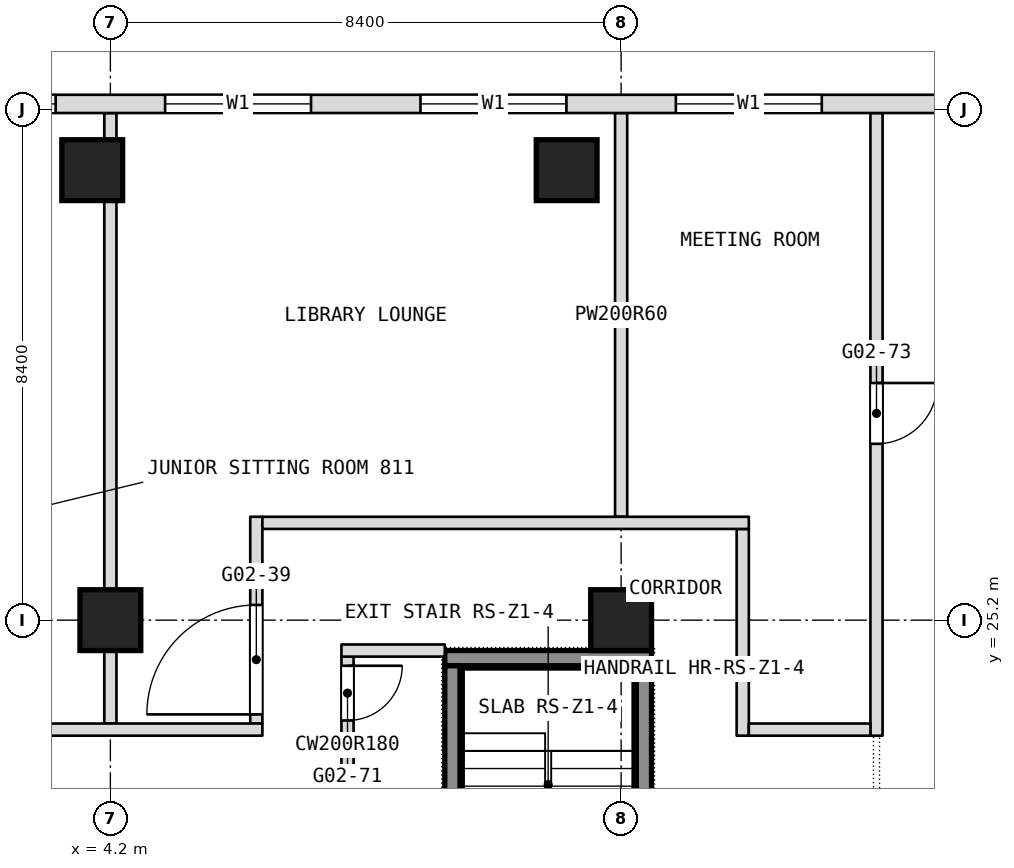
"""IFC4 building model, lengths in metres.
Left out: names, types, materials, properties, quantities, classifications, styles, units other than length and angle.
Written with IfcOpenShell. Run it as: python <this file> out.ifc"""

import sys

from ifc_helpers import new_model, si_unit, direction, frame, frame_2d, origin, origin_2d, place, context, subcontext, project, spatial, rectangle, extrude, element, fill, save


model = new_model("IFC4")
c1 = context("Model", 3, precision=1e-05, world=origin(), true_north=direction((0.0, 1.0)))
c2 = subcontext(c1, "Body", "Model", "MODEL_VIEW")
j1 = project(units=[si_unit("LENGTHUNIT", "METRE"), si_unit("PLANEANGLEUNIT", "RADIAN")], contexts=[c1])
p1 = place(None, origin())
s1 = spatial("IfcSite", under=j1, at=p1, CompositionType="ELEMENT")
p2 = place(p1, origin())
s2 = spatial("IfcBuilding", under=s1, at=p2, CompositionType="ELEMENT")
p3 = place(p2, frame((0.0, 0.0, 43.7)))
s3 = spatial("IfcBuildingStorey", under=s2, at=p3, CompositionType="ELEMENT", Elevation=43.7)
for number, where, z_axis, x_axis in (
    (1, (4.2, 25.2, 0.0), (0.0, 0.0, 1.0), (1.0, 0.0, 0.0)),
    (2, (12.6, 25.2, 0.0), (0.0, 0.0, 1.0), (1.0, 0.0, 0.0)),
    (3, (3.901, 32.6, 0.0), (0.0, 0.0, 1.0), (1.0, 0.0, 0.0)),
    (4, (11.704, 32.6, 0.0), (0.0, 0.0, 1.0), (1.0, 0.0, 0.0)),
):
    element("IfcColumn", number, at=place(p3, frame(where, z_axis=z_axis, x_axis=x_axis)), inside=s3, PredefinedType="COLUMN", context=c2, shape_type="SweptSolid", body=[
        extrude(rectangle(XDim=1.0, YDim=1.0, at=origin_2d()), origin(), (0.0, 0.0, 1.0), 3.6),
    ])
p4 = place(p3, frame((16.8, 23.3, 0.0), z_axis=(0.0, 0.0, 1.0), x_axis=(0.0, 1.0, 0.0)))
e5 = element("IfcWall", 5, at=p4, inside=s3, PredefinedType="PARTITIONING", context=c2, shape_type="SweptSolid", body=[
    extrude(rectangle(XDim=10.24, YDim=0.2, at=frame_2d((5.12, 0.0))), origin(), (0.0, 0.0, 1.0), 3.34),
])
p5 = place(p4, frame((4.8, 0.0, 0.0)))
e6 = element("IfcOpeningElement", 6, at=p5, cuts=e5, PredefinedType="OPENING", context=c2, shape_type="SweptSolid", body=[
    extrude(rectangle(XDim=1.0, YDim=2.1, at=frame_2d((0.5, 1.05))), frame((0.0, 0.1, 0.0), z_axis=(0.0, -1.0, 0.0), x_axis=(1.0, 0.0, 0.0)), (0.0, 0.0, 1.0), 0.2),
])
p6 = place(p3, frame((14.6, 23.3, 0.0), z_axis=(0.0, 0.0, 1.0), x_axis=(0.0, 1.0, 0.0)))
e7 = element("IfcWall", 7, at=p6, inside=s3, PredefinedType="PARTITIONING", context=c2, shape_type="SweptSolid", body=[
    extrude(rectangle(XDim=3.4, YDim=0.2, at=frame_2d((1.7, 0.0))), origin(), (0.0, 0.0, 1.0), 3.34),
])
p7 = place(p3, frame((12.6, 26.9, 0.0), z_axis=(0.0, 0.0, 1.0), x_axis=(0.0, 1.0, 0.0)))
e8 = element("IfcWall", 8, at=p7, inside=s3, PredefinedType="PARTITIONING", context=c2, shape_type="SweptSolid", body=[
    extrude(rectangle(XDim=6.64, YDim=0.2, at=frame_2d((3.32, 0.0))), origin(), (0.0, 0.0, 1.0), 3.34),
])
p8 = place(p3, frame((8.1, 21.7, 0.0), z_axis=(0.0, 0.0, 1.0), x_axis=(0.0, 1.0, 0.0)))
e9 = element("IfcWall", 9, at=p8, inside=s3, PredefinedType="PARTITIONING", context=c2, shape_type="SweptSolid", body=[
    extrude(rectangle(XDim=2.9, YDim=0.2, at=frame_2d((1.45, 0.0))), origin(), (0.0, 0.0, 1.0), 3.34),
])
p9 = place(p8, frame((1.85, 0.0, 0.0)))
e10 = element("IfcOpeningElement", 10, at=p9, cuts=e9, PredefinedType="OPENING", context=c2, shape_type="SweptSolid", body=[
    extrude(rectangle(XDim=0.9, YDim=2.1, at=frame_2d((0.45, 1.05))), frame((0.0, 0.1, 0.0), z_axis=(0.0, -1.0, 0.0), x_axis=(1.0, 0.0, 0.0)), (0.0, 0.0, 1.0), 0.2),
])
p10 = place(p3, frame((6.6, 23.5, 0.0), z_axis=(0.0, 0.0, 1.0), x_axis=(0.0, 1.0, 0.0)))
e11 = element("IfcWall", 11, at=p10, inside=s3, PredefinedType="PARTITIONING", context=c2, shape_type="SweptSolid", body=[
    extrude(rectangle(XDim=3.4, YDim=0.2, at=frame_2d((1.7, 0.0))), origin(), (0.0, 0.0, 1.0), 3.34),
])
p11 = place(p10, frame((0.15, 0.0, 0.0)))
e12 = element("IfcOpeningElement", 12, at=p11, cuts=e11, PredefinedType="OPENING", context=c2, shape_type="SweptSolid", body=[
    extrude(rectangle(XDim=1.8, YDim=2.1, at=frame_2d((0.9, 1.05))), frame((0.0, 0.1, 0.0), z_axis=(0.0, -1.0, 0.0), x_axis=(1.0, 0.0, 0.0)), (0.0, 0.0, 1.0), 0.2),
])
p12 = place(p3, frame((4.2, 23.5, 0.0), z_axis=(0.0, 0.0, 1.0), x_axis=(0.0, 1.0, 0.0)))
e13 = element("IfcWall", 13, at=p12, inside=s3, PredefinedType="PARTITIONING", context=c2, shape_type="SweptSolid", body=[
    extrude(rectangle(XDim=10.04, YDim=0.2, at=frame_2d((5.02, 0.0))), origin(), (0.0, 0.0, 1.0), 3.34),
])
p13 = place(p3, frame((-16.7, 23.4, 0.0), z_axis=(0.0, 0.0, 1.0), x_axis=(1.0, 0.0, 0.0)))
e14 = element("IfcWall", 14, at=p13, inside=s3, PredefinedType="PARTITIONING", context=c2, shape_type="SweptSolid", body=[
    extrude(rectangle(XDim=23.4, YDim=0.2, at=frame_2d((11.7, 0.0))), origin(), (0.0, 0.0, 1.0), 3.34),
])
p14 = place(p13, frame((2.4, 0.0, 0.0)))
e15 = element("IfcOpeningElement", 15, at=p14, cuts=e14, PredefinedType="OPENING", context=c2, shape_type="SweptSolid", body=[
    extrude(rectangle(XDim=0.9, YDim=2.1, at=frame_2d((0.45, 1.05))), frame((0.0, 0.1, 0.0), z_axis=(0.0, -1.0, 0.0), x_axis=(1.0, 0.0, 0.0)), (0.0, 0.0, 1.0), 0.2),
])
p15 = place(p13, frame((4.9, 0.0, 0.0)))
e16 = element("IfcOpeningElement", 16, at=p15, cuts=e14, PredefinedType="OPENING", context=c2, shape_type="SweptSolid", body=[
    extrude(rectangle(XDim=0.9, YDim=2.1, at=frame_2d((0.45, 1.05))), frame((0.0, 0.1, 0.0), z_axis=(0.0, -1.0, 0.0), x_axis=(1.0, 0.0, 0.0)), (0.0, 0.0, 1.0), 0.2),
])
p16 = place(p13, frame((10.8, 0.0, 0.0)))
e17 = element("IfcOpeningElement", 17, at=p16, cuts=e14, PredefinedType="OPENING", context=c2, shape_type="SweptSolid", body=[
    extrude(rectangle(XDim=0.9, YDim=2.1, at=frame_2d((0.45, 1.05))), frame((0.0, 0.1, 0.0), z_axis=(0.0, -1.0, 0.0), x_axis=(1.0, 0.0, 0.0)), (0.0, 0.0, 1.0), 0.2),
])
p17 = place(p13, frame((18.25, 0.0, 0.0)))
e18 = element("IfcOpeningElement", 18, at=p17, cuts=e14, PredefinedType="OPENING", context=c2, shape_type="SweptSolid", body=[
    extrude(rectangle(XDim=1.1, YDim=2.1, at=frame_2d((0.55, 1.05))), frame((0.0, 0.1, 0.0), z_axis=(0.0, -1.0, 0.0), x_axis=(1.0, 0.0, 0.0)), (0.0, 0.0, 1.0), 0.2),
])
p18 = place(p3, frame((14.7, 23.4, 0.0), z_axis=(0.0, 0.0, 1.0), x_axis=(1.0, 0.0, 0.0)))
e19 = element("IfcWall", 19, at=p18, inside=s3, PredefinedType="PARTITIONING", context=c2, shape_type="SweptSolid", body=[
    extrude(rectangle(XDim=2.0, YDim=0.2, at=frame_2d((1.0, 0.0))), origin(), (0.0, 0.0, 1.0), 3.34),
])
p19 = place(p3, frame((8.0, 24.7, 0.0), z_axis=(0.0, 0.0, 1.0), x_axis=(1.0, 0.0, 0.0)))
e20 = element("IfcWall", 20, at=p19, inside=s3, PredefinedType="PARTITIONING", context=c2, shape_type="SweptSolid", body=[
    extrude(rectangle(XDim=1.7, YDim=0.2, at=frame_2d((0.85, 0.0))), origin(), (0.0, 0.0, 1.0), 3.34),
])
p20 = place(p3, frame((6.7, 26.8, 0.0), z_axis=(0.0, 0.0, 1.0), x_axis=(1.0, 0.0, 0.0)))
e21 = element("IfcWall", 21, at=p20, inside=s3, PredefinedType="PARTITIONING", context=c2, shape_type="SweptSolid", body=[
    extrude(rectangle(XDim=8.0, YDim=0.2, at=frame_2d((4.0, 0.0))), origin(), (0.0, 0.0, 1.0), 3.34),
])
p21 = place(p3, frame((23.406, 33.69, 0.0), z_axis=(0.0, 0.0, 1.0), x_axis=(-1.0, 0.0, 0.0)))
e22 = element("IfcWall", 22, at=p21, inside=s3, PredefinedType="NOTDEFINED", context=c2, shape_type="SweptSolid", body=[
    extrude(rectangle(XDim=46.812, YDim=0.3, at=frame_2d((23.406, 0.0))), origin(), (0.0, 0.0, 1.0), 3.6),
])
p22 = place(p21, frame((2.186, 0.0, 0.9)))
e23 = element("IfcOpeningElement", 23, at=p22, cuts=e22, PredefinedType="OPENING", context=c2, shape_type="SweptSolid", body=[
    extrude(rectangle(XDim=2.4, YDim=2.1, at=frame_2d((1.2, 1.05))), frame((0.0, 0.15, 0.0), z_axis=(0.0, -1.0, 0.0), x_axis=(1.0, 0.0, 0.0)), (0.0, 0.0, 1.0), 0.3),
])
p23 = place(p21, frame((7.506, 0.0, 0.9)))
e24 = element("IfcOpeningElement", 24, at=p23, cuts=e22, PredefinedType="OPENING", context=c2, shape_type="SweptSolid", body=[
    extrude(rectangle(XDim=2.4, YDim=2.1, at=frame_2d((1.2, 1.05))), frame((0.0, 0.15, 0.0), z_axis=(0.0, -1.0, 0.0), x_axis=(1.0, 0.0, 0.0)), (0.0, 0.0, 1.0), 0.3),
])
p24 = place(p21, frame((11.706, 0.0, 0.9)))
e25 = element("IfcOpeningElement", 25, at=p24, cuts=e22, PredefinedType="OPENING", context=c2, shape_type="SweptSolid", body=[
    extrude(rectangle(XDim=2.4, YDim=2.1, at=frame_2d((1.2, 1.05))), frame((0.0, 0.15, 0.0), z_axis=(0.0, -1.0, 0.0), x_axis=(1.0, 0.0, 0.0)), (0.0, 0.0, 1.0), 0.3),
])
p25 = place(p21, frame((15.906, 0.0, 0.9)))
e26 = element("IfcOpeningElement", 26, at=p25, cuts=e22, PredefinedType="OPENING", context=c2, shape_type="SweptSolid", body=[
    extrude(rectangle(XDim=2.4, YDim=2.1, at=frame_2d((1.2, 1.05))), frame((0.0, 0.15, 0.0), z_axis=(0.0, -1.0, 0.0), x_axis=(1.0, 0.0, 0.0)), (0.0, 0.0, 1.0), 0.3),
])
p26 = place(p21, frame((20.106, 0.0, 0.9)))
e27 = element("IfcOpeningElement", 27, at=p26, cuts=e22, PredefinedType="OPENING", context=c2, shape_type="SweptSolid", body=[
    extrude(rectangle(XDim=2.4, YDim=2.1, at=frame_2d((1.2, 1.05))), frame((0.0, 0.15, 0.0), z_axis=(0.0, -1.0, 0.0), x_axis=(1.0, 0.0, 0.0)), (0.0, 0.0, 1.0), 0.3),
])
p27 = place(p21, frame((24.306, 0.0, 0.9)))
e28 = element("IfcOpeningElement", 28, at=p27, cuts=e22, PredefinedType="OPENING", context=c2, shape_type="SweptSolid", body=[
    extrude(rectangle(XDim=2.4, YDim=2.1, at=frame_2d((1.2, 1.05))), frame((0.0, 0.15, 0.0), z_axis=(0.0, -1.0, 0.0), x_axis=(1.0, 0.0, 0.0)), (0.0, 0.0, 1.0), 0.3),
])
p28 = place(p21, frame((28.506, 0.0, 0.9)))
e29 = element("IfcOpeningElement", 29, at=p28, cuts=e22, PredefinedType="OPENING", context=c2, shape_type="SweptSolid", body=[
    extrude(rectangle(XDim=2.4, YDim=2.1, at=frame_2d((1.2, 1.05))), frame((0.0, 0.15, 0.0), z_axis=(0.0, -1.0, 0.0), x_axis=(1.0, 0.0, 0.0)), (0.0, 0.0, 1.0), 0.3),
])
p29 = place(p21, frame((32.706, 0.0, 0.9)))
e30 = element("IfcOpeningElement", 30, at=p29, cuts=e22, PredefinedType="OPENING", context=c2, shape_type="SweptSolid", body=[
    extrude(rectangle(XDim=2.4, YDim=2.1, at=frame_2d((1.2, 1.05))), frame((0.0, 0.15, 0.0), z_axis=(0.0, -1.0, 0.0), x_axis=(1.0, 0.0, 0.0)), (0.0, 0.0, 1.0), 0.3),
])
p30 = place(p21, frame((36.906, 0.0, 0.9)))
e31 = element("IfcOpeningElement", 31, at=p30, cuts=e22, PredefinedType="OPENING", context=c2, shape_type="SweptSolid", body=[
    extrude(rectangle(XDim=2.4, YDim=2.1, at=frame_2d((1.2, 1.05))), frame((0.0, 0.15, 0.0), z_axis=(0.0, -1.0, 0.0), x_axis=(1.0, 0.0, 0.0)), (0.0, 0.0, 1.0), 0.3),
])
p31 = place(p21, frame((42.226, 0.0, 0.9)))
e32 = element("IfcOpeningElement", 32, at=p31, cuts=e22, PredefinedType="OPENING", context=c2, shape_type="SweptSolid", body=[
    extrude(rectangle(XDim=2.4, YDim=2.1, at=frame_2d((1.2, 1.05))), frame((0.0, 0.15, 0.0), z_axis=(0.0, -1.0, 0.0), x_axis=(1.0, 0.0, 0.0)), (0.0, 0.0, 1.0), 0.3),
])
p32 = place(p3, frame((9.7, 24.575, 0.1), z_axis=(0.0, 0.0, 1.0), x_axis=(1.0, 0.0, 0.0)))
e33 = element("IfcWall", 33, at=p32, inside=s3, PredefinedType="SHEAR", context=c2, shape_type="SweptSolid", body=[
    extrude(rectangle(XDim=3.4, YDim=0.25, at=frame_2d((1.7, 0.0))), origin(), (0.0, 0.0, 1.0), 3.6),
])
p33 = place(p3, frame((9.825, 18.75, 0.1), z_axis=(0.0, 0.0, 1.0), x_axis=(0.0, 1.0, 0.0)))
e34 = element("IfcWall", 34, at=p33, inside=s3, PredefinedType="SHEAR", context=c2, shape_type="SweptSolid", body=[
    extrude(rectangle(XDim=5.7, YDim=0.25, at=frame_2d((2.85, 0.0))), origin(), (0.0, 0.0, 1.0), 3.6),
])
p34 = place(p33, frame((0.2, 0.0, 0.0)))
e35 = element("IfcOpeningElement", 35, at=p34, cuts=e34, PredefinedType="OPENING", context=c2, shape_type="SweptSolid", body=[
    extrude(rectangle(XDim=1.0, YDim=2.1, at=frame_2d((0.5, 1.05))), frame((0.0, 0.125, 0.0), z_axis=(0.0, -1.0, 0.0), x_axis=(1.0, 0.0, 0.0)), (0.0, 0.0, 1.0), 0.25),
])
p35 = place(p3, frame((12.975, 18.75, 0.1), z_axis=(0.0, 0.0, 1.0), x_axis=(0.0, 1.0, 0.0)))
e36 = element("IfcWall", 36, at=p35, inside=s3, PredefinedType="SHEAR", context=c2, shape_type="SweptSolid", body=[
    extrude(rectangle(XDim=5.7, YDim=0.25, at=frame_2d((2.85, 0.0))), origin(), (0.0, 0.0, 1.0), 3.6),
])
p36 = place(p5, origin())
e37 = element("IfcDoor", 37, at=p36, inside=s3, OperationType="SINGLE_SWING_LEFT", PredefinedType="DOOR", context=c2, shape_type="SweptSolid", body=[
    extrude(rectangle(XDim=1.0, YDim=2.1, at=frame_2d((0.5, 1.05))), frame((0.0, 0.025, 0.0), z_axis=(0.0, -1.0, 0.0), x_axis=(1.0, 0.0, 0.0)), (0.0, 0.0, 1.0), 0.05),
])
fill(e6, e37)
p37 = place(p9, origin())
e38 = element("IfcDoor", 38, at=p37, inside=s3, OperationType="SINGLE_SWING_LEFT", PredefinedType="DOOR", context=c2, shape_type="SweptSolid", body=[
    extrude(rectangle(XDim=0.9, YDim=2.1, at=frame_2d((0.45, 1.05))), frame((0.0, 0.025, 0.0), z_axis=(0.0, -1.0, 0.0), x_axis=(1.0, 0.0, 0.0)), (0.0, 0.0, 1.0), 0.05),
])
fill(e10, e38)
p38 = place(p11, origin())
e39 = element("IfcDoor", 39, at=p38, inside=s3, OperationType="DOUBLE_DOOR_SINGLE_SWING", PredefinedType="DOOR", context=c2, shape_type="SweptSolid", body=[
    extrude(rectangle(XDim=1.8, YDim=2.1, at=frame_2d((0.9, 1.05))), frame((0.0, 0.025, 0.0), z_axis=(0.0, -1.0, 0.0), x_axis=(1.0, 0.0, 0.0)), (0.0, 0.0, 1.0), 0.05),
])
fill(e12, e39)
p39 = place(p23, origin())
e40 = element("IfcWindow", 40, at=p39, inside=s3, PartitioningType="SINGLE_PANEL", PredefinedType="WINDOW", context=c2, shape_type="SweptSolid", body=[
    extrude(rectangle(XDim=2.4, YDim=2.1, at=frame_2d((1.2, 1.05))), frame((0.0, 0.03, 0.0), z_axis=(0.0, -1.0, 0.0), x_axis=(1.0, 0.0, 0.0)), (0.0, 0.0, 1.0), 0.06),
])
fill(e24, e40)
p40 = place(p24, origin())
e41 = element("IfcWindow", 41, at=p40, inside=s3, PartitioningType="SINGLE_PANEL", PredefinedType="WINDOW", context=c2, shape_type="SweptSolid", body=[
    extrude(rectangle(XDim=2.4, YDim=2.1, at=frame_2d((1.2, 1.05))), frame((0.0, 0.03, 0.0), z_axis=(0.0, -1.0, 0.0), x_axis=(1.0, 0.0, 0.0)), (0.0, 0.0, 1.0), 0.06),
])
fill(e25, e41)
p41 = place(p25, origin())
e42 = element("IfcWindow", 42, at=p41, inside=s3, PartitioningType="SINGLE_PANEL", PredefinedType="WINDOW", context=c2, shape_type="SweptSolid", body=[
    extrude(rectangle(XDim=2.4, YDim=2.1, at=frame_2d((1.2, 1.05))), frame((0.0, 0.03, 0.0), z_axis=(0.0, -1.0, 0.0), x_axis=(1.0, 0.0, 0.0)), (0.0, 0.0, 1.0), 0.06),
])
fill(e26, e42)
p42 = place(p26, origin())
e43 = element("IfcWindow", 43, at=p42, inside=s3, PartitioningType="SINGLE_PANEL", PredefinedType="WINDOW", context=c2, shape_type="SweptSolid", body=[
    extrude(rectangle(XDim=2.4, YDim=2.1, at=frame_2d((1.2, 1.05))), frame((0.0, 0.03, 0.0), z_axis=(0.0, -1.0, 0.0), x_axis=(1.0, 0.0, 0.0)), (0.0, 0.0, 1.0), 0.06),
])
fill(e27, e43)
save(model, sys.argv[1])
